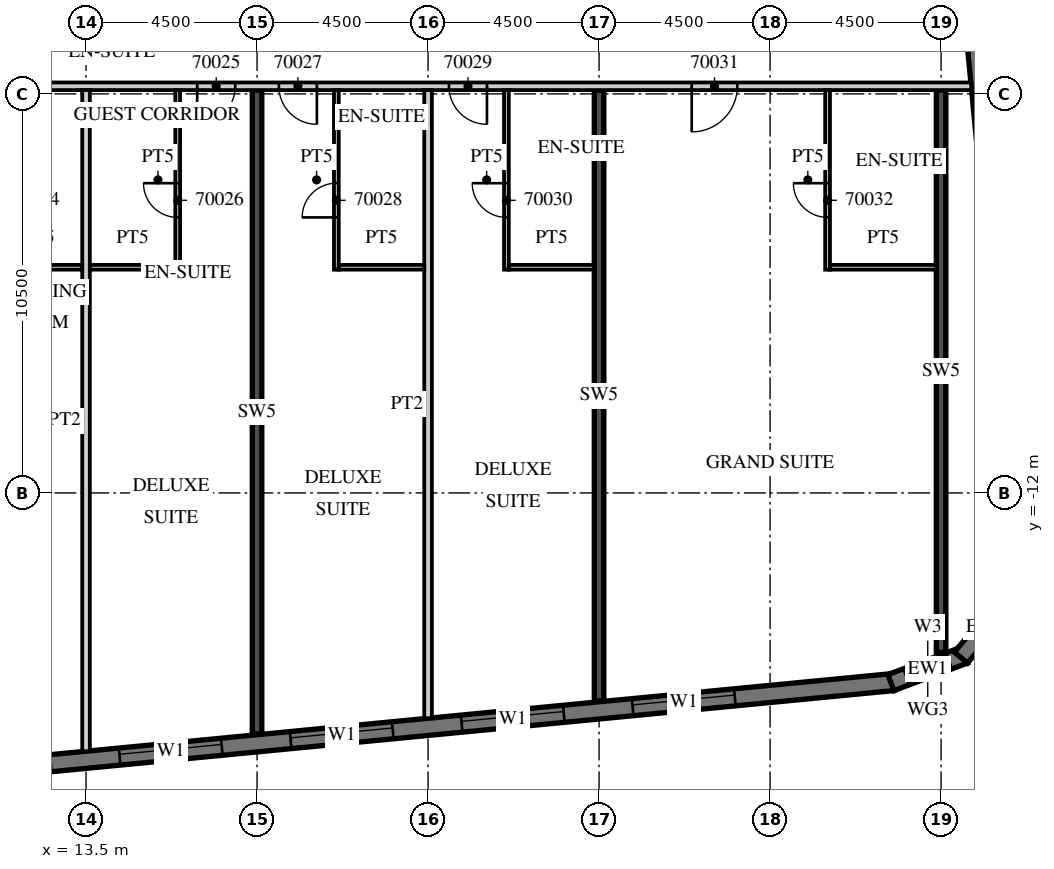
"""IFC4 building model, lengths in metres.
Left out: names, types, materials, properties, quantities, classifications, styles, units other than length and angle.
Written with IfcOpenShell. Run it as: python <this file> out.ifc"""

import sys

from ifc_helpers import new_model, si_unit, direction, frame, frame_2d, origin, place, context, subcontext, project, spatial, polyline, rectangle, outline, extrude, element, fill, save


model = new_model("IFC4")
c1 = context("Model", 3, precision=1e-05, world=origin(), true_north=direction((0.0, 1.0)))
c2 = subcontext(c1, "Body", "Model", "MODEL_VIEW")
j1 = project(units=[si_unit("LENGTHUNIT", "METRE"), si_unit("PLANEANGLEUNIT", "RADIAN")], contexts=[c1])
p1 = place(None, origin())
s1 = spatial("IfcSite", under=j1, at=p1, CompositionType="ELEMENT")
p2 = place(p1, origin())
s2 = spatial("IfcBuilding", under=s1, at=p2, CompositionType="ELEMENT")
p3 = place(p2, frame((0.0, 0.0, 281.7)))
s3 = spatial("IfcBuildingStorey", under=s2, at=p3, CompositionType="ELEMENT", Elevation=281.7)
p4 = place(p3, frame((18.0, -18.341, 0.0), z_axis=(0.0, 0.0, 1.0), x_axis=(0.0, 1.0, 0.0)))
e1 = element("IfcWall", 1, at=p4, inside=s3, PredefinedType="SHEAR", context=c2, shape_type="SweptSolid", body=[
    extrude(rectangle(XDim=16.941, YDim=0.25, at=frame_2d((8.47, 0.0))), origin(), (0.0, 0.0, 1.0), 3.3),
])
p5 = place(p3, frame((27.0, -17.474, 0.0), z_axis=(0.0, 0.0, 1.0), x_axis=(0.0, 1.0, 0.0)))
e2 = element("IfcWall", 2, at=p5, inside=s3, PredefinedType="SHEAR", context=c2, shape_type="SweptSolid", body=[
    extrude(rectangle(XDim=16.074, YDim=0.25, at=frame_2d((8.037, 0.0))), origin(), (0.0, 0.0, 1.0), 3.3),
])
p6 = place(p3, frame((36.0, -16.199, 0.0), z_axis=(0.0, 0.0, 1.0), x_axis=(0.0, 1.0, 0.0)))
e3 = element("IfcWall", 3, at=p6, inside=s3, PredefinedType="SHEAR", context=c2, shape_type="SweptSolid", body=[
    extrude(rectangle(XDim=14.799, YDim=0.25, at=frame_2d((7.399, 0.0))), origin(), (0.0, 0.0, 1.0), 3.3),
])
p7 = place(p3, frame((-13.521, -21.624, 0.0), z_axis=(0.0, 0.0, 1.0), x_axis=(0.995396186218, 0.095845878695, 0.0)))
e4 = element("IfcWall", 4, at=p7, inside=s3, PredefinedType="SOLIDWALL", context=c2, shape_type="SweptSolid", body=[
    extrude(rectangle(XDim=48.481, YDim=0.45, at=frame_2d((24.241, 0.0))), origin(), (0.0, 0.0, 1.0), 3.02),
])
p8 = place(p7, frame((0.91, 0.0, 0.45)))
e5 = element("IfcOpeningElement", 5, at=p8, cuts=e4, PredefinedType="OPENING", context=c2, shape_type="SweptSolid", body=[
    extrude(rectangle(XDim=2.7, YDim=2.25, at=frame_2d((1.35, 1.125))), frame((0.0, 0.235, 0.0), z_axis=(0.0, -1.0, 0.0), x_axis=(1.0, 0.0, 0.0)), (0.0, 0.0, 1.0), 0.47),
])
p9 = place(p7, frame((5.431, 0.0, 0.45)))
e6 = element("IfcOpeningElement", 6, at=p9, cuts=e4, PredefinedType="OPENING", context=c2, shape_type="SweptSolid", body=[
    extrude(rectangle(XDim=2.7, YDim=2.25, at=frame_2d((1.35, 1.125))), frame((0.0, 0.235, 0.0), z_axis=(0.0, -1.0, 0.0), x_axis=(1.0, 0.0, 0.0)), (0.0, 0.0, 1.0), 0.47),
])
p10 = place(p7, frame((9.952, 0.0, 0.45)))
e7 = element("IfcOpeningElement", 7, at=p10, cuts=e4, PredefinedType="OPENING", context=c2, shape_type="SweptSolid", body=[
    extrude(rectangle(XDim=2.7, YDim=2.25, at=frame_2d((1.35, 1.125))), frame((0.0, 0.235, 0.0), z_axis=(0.0, -1.0, 0.0), x_axis=(1.0, 0.0, 0.0)), (0.0, 0.0, 1.0), 0.47),
])
p11 = place(p7, frame((14.473, 0.0, 0.45)))
e8 = element("IfcOpeningElement", 8, at=p11, cuts=e4, PredefinedType="OPENING", context=c2, shape_type="SweptSolid", body=[
    extrude(rectangle(XDim=2.7, YDim=2.25, at=frame_2d((1.35, 1.125))), frame((0.0, 0.235, 0.0), z_axis=(0.0, -1.0, 0.0), x_axis=(1.0, 0.0, 0.0)), (0.0, 0.0, 1.0), 0.47),
])
p12 = place(p7, frame((18.994, 0.0, 0.45)))
e9 = element("IfcOpeningElement", 9, at=p12, cuts=e4, PredefinedType="OPENING", context=c2, shape_type="SweptSolid", body=[
    extrude(rectangle(XDim=2.7, YDim=2.25, at=frame_2d((1.35, 1.125))), frame((0.0, 0.235, 0.0), z_axis=(0.0, -1.0, 0.0), x_axis=(1.0, 0.0, 0.0)), (0.0, 0.0, 1.0), 0.47),
])
p13 = place(p7, frame((23.514, 0.0, 0.45)))
e10 = element("IfcOpeningElement", 10, at=p13, cuts=e4, PredefinedType="OPENING", context=c2, shape_type="SweptSolid", body=[
    extrude(rectangle(XDim=2.7, YDim=2.25, at=frame_2d((1.35, 1.125))), frame((0.0, 0.235, 0.0), z_axis=(0.0, -1.0, 0.0), x_axis=(1.0, 0.0, 0.0)), (0.0, 0.0, 1.0), 0.47),
])
p14 = place(p7, frame((28.035, 0.0, 0.45)))
e11 = element("IfcOpeningElement", 11, at=p14, cuts=e4, PredefinedType="OPENING", context=c2, shape_type="SweptSolid", body=[
    extrude(rectangle(XDim=2.7, YDim=2.25, at=frame_2d((1.35, 1.125))), frame((0.0, 0.235, 0.0), z_axis=(0.0, -1.0, 0.0), x_axis=(1.0, 0.0, 0.0)), (0.0, 0.0, 1.0), 0.47),
])
p15 = place(p7, frame((32.556, 0.0, 0.45)))
e12 = element("IfcOpeningElement", 12, at=p15, cuts=e4, PredefinedType="OPENING", context=c2, shape_type="SweptSolid", body=[
    extrude(rectangle(XDim=2.7, YDim=2.25, at=frame_2d((1.35, 1.125))), frame((0.0, 0.235, 0.0), z_axis=(0.0, -1.0, 0.0), x_axis=(1.0, 0.0, 0.0)), (0.0, 0.0, 1.0), 0.47),
])
p16 = place(p7, frame((37.077, 0.0, 0.45)))
e13 = element("IfcOpeningElement", 13, at=p16, cuts=e4, PredefinedType="OPENING", context=c2, shape_type="SweptSolid", body=[
    extrude(rectangle(XDim=2.7, YDim=2.25, at=frame_2d((1.35, 1.125))), frame((0.0, 0.235, 0.0), z_axis=(0.0, -1.0, 0.0), x_axis=(1.0, 0.0, 0.0)), (0.0, 0.0, 1.0), 0.47),
])
p17 = place(p7, frame((41.598, 0.0, 0.45)))
e14 = element("IfcOpeningElement", 14, at=p17, cuts=e4, PredefinedType="OPENING", context=c2, shape_type="SweptSolid", body=[
    extrude(rectangle(XDim=2.7, YDim=2.25, at=frame_2d((1.35, 1.125))), frame((0.0, 0.235, 0.0), z_axis=(0.0, -1.0, 0.0), x_axis=(1.0, 0.0, 0.0)), (0.0, 0.0, 1.0), 0.47),
])
p18 = place(p3, frame((34.679, -16.99, 0.0), z_axis=(0.0, 0.0, 1.0), x_axis=(0.936677599948, 0.350192909346, 0.0)))
e15 = element("IfcWall", 15, at=p18, inside=s3, PredefinedType="SOLIDWALL", context=c2, shape_type="SweptSolid", body=[
    extrude(outline(polyline([(0.0, -0.225), (2.071, -0.225), (1.95, 0.225), (0.121, 0.225), (0.0, -0.225)])), origin(), (0.0, 0.0, 1.0), 3.02),
])
p19 = place(p18, frame((0.435, 0.0, 0.45)))
e16 = element("IfcOpeningElement", 16, at=p19, cuts=e15, PredefinedType="OPENING", context=c2, shape_type="SweptSolid", body=[
    extrude(rectangle(XDim=1.2, YDim=2.25, at=frame_2d((0.6, 1.125))), frame((0.0, 0.235, 0.0), z_axis=(0.0, -1.0, 0.0), x_axis=(1.0, 0.0, 0.0)), (0.0, 0.0, 1.0), 0.47),
])
p20 = place(p3, frame((36.524, -16.333, 0.0), z_axis=(0.0, 0.0, 1.0), x_axis=(0.636046112757, 0.771651049663, 0.0)))
e17 = element("IfcWall", 17, at=p20, inside=s3, PredefinedType="SOLIDWALL", context=c2, shape_type="SweptSolid", body=[
    extrude(outline(polyline([(0.0, -0.225), (2.071, -0.225), (1.95, 0.225), (0.121, 0.225), (0.0, -0.225)])), origin(), (0.0, 0.0, 1.0), 3.02),
])
p21 = place(p3, frame((38.132, -12.858, 0.0), z_axis=(0.0, 0.0, 1.0), x_axis=(-0.095847749461, 0.995396006082, 0.0)))
e18 = element("IfcWall", 18, at=p21, inside=s3, PredefinedType="SOLIDWALL", context=c2, shape_type="SweptSolid", body=[
    extrude(rectangle(XDim=32.0, YDim=0.45, at=frame_2d((16.0, 0.0))), origin(), (0.0, 0.0, 1.0), 3.02),
])
p22 = place(p3, frame((-13.5, -1.3, 0.0), z_axis=(0.0, 0.0, 1.0), x_axis=(1.0, 0.0, 0.0)))
e19 = element("IfcWall", 19, at=p22, inside=s3, PredefinedType="PARTITIONING", context=c2, shape_type="SweptSolid", body=[
    extrude(rectangle(XDim=50.293, YDim=0.2, at=frame_2d((25.146, 0.0))), origin(), (0.0, 0.0, 1.0), 3.02),
])
p23 = place(p22, frame((2.925, 0.0, 0.0)))
e20 = element("IfcOpeningElement", 20, at=p23, cuts=e19, PredefinedType="OPENING", context=c2, shape_type="SweptSolid", body=[
    extrude(rectangle(XDim=1.0, YDim=2.1, at=frame_2d((0.5, 1.05))), frame((0.0, 0.11, 0.0), z_axis=(0.0, -1.0, 0.0), x_axis=(1.0, 0.0, 0.0)), (0.0, 0.0, 1.0), 0.22),
])
p24 = place(p22, frame((6.938, 0.0, 0.0)))
e21 = element("IfcOpeningElement", 21, at=p24, cuts=e19, PredefinedType="OPENING", context=c2, shape_type="SweptSolid", body=[
    extrude(rectangle(XDim=1.2, YDim=2.1, at=frame_2d((0.6, 1.05))), frame((0.0, 0.11, 0.0), z_axis=(0.0, -1.0, 0.0), x_axis=(1.0, 0.0, 0.0)), (0.0, 0.0, 1.0), 0.22),
])
p25 = place(p22, frame((14.075, 0.0, 0.0)))
e22 = element("IfcOpeningElement", 22, at=p25, cuts=e19, PredefinedType="OPENING", context=c2, shape_type="SweptSolid", body=[
    extrude(rectangle(XDim=1.0, YDim=2.1, at=frame_2d((0.5, 1.05))), frame((0.0, 0.11, 0.0), z_axis=(0.0, -1.0, 0.0), x_axis=(1.0, 0.0, 0.0)), (0.0, 0.0, 1.0), 0.22),
])
p26 = place(p22, frame((18.55, 0.0, 0.0)))
e23 = element("IfcOpeningElement", 23, at=p26, cuts=e19, PredefinedType="OPENING", context=c2, shape_type="SweptSolid", body=[
    extrude(rectangle(XDim=1.0, YDim=2.1, at=frame_2d((0.5, 1.05))), frame((0.0, 0.11, 0.0), z_axis=(0.0, -1.0, 0.0), x_axis=(1.0, 0.0, 0.0)), (0.0, 0.0, 1.0), 0.22),
])
p27 = place(p22, frame((23.075, 0.0, 0.0)))
e24 = element("IfcOpeningElement", 24, at=p27, cuts=e19, PredefinedType="OPENING", context=c2, shape_type="SweptSolid", body=[
    extrude(rectangle(XDim=1.0, YDim=2.1, at=frame_2d((0.5, 1.05))), frame((0.0, 0.11, 0.0), z_axis=(0.0, -1.0, 0.0), x_axis=(1.0, 0.0, 0.0)), (0.0, 0.0, 1.0), 0.22),
])
p28 = place(p22, frame((29.925, 0.0, 0.0)))
e25 = element("IfcOpeningElement", 25, at=p28, cuts=e19, PredefinedType="OPENING", context=c2, shape_type="SweptSolid", body=[
    extrude(rectangle(XDim=1.0, YDim=2.1, at=frame_2d((0.5, 1.05))), frame((0.0, 0.11, 0.0), z_axis=(0.0, -1.0, 0.0), x_axis=(1.0, 0.0, 0.0)), (0.0, 0.0, 1.0), 0.22),
])
p29 = place(p22, frame((32.075, 0.0, 0.0)))
e26 = element("IfcOpeningElement", 26, at=p29, cuts=e19, PredefinedType="OPENING", context=c2, shape_type="SweptSolid", body=[
    extrude(rectangle(XDim=1.0, YDim=2.1, at=frame_2d((0.5, 1.05))), frame((0.0, 0.11, 0.0), z_axis=(0.0, -1.0, 0.0), x_axis=(1.0, 0.0, 0.0)), (0.0, 0.0, 1.0), 0.22),
])
p30 = place(p22, frame((36.55, 0.0, 0.0)))
e27 = element("IfcOpeningElement", 27, at=p30, cuts=e19, PredefinedType="OPENING", context=c2, shape_type="SweptSolid", body=[
    extrude(rectangle(XDim=1.0, YDim=2.1, at=frame_2d((0.5, 1.05))), frame((0.0, 0.11, 0.0), z_axis=(0.0, -1.0, 0.0), x_axis=(1.0, 0.0, 0.0)), (0.0, 0.0, 1.0), 0.22),
])
p31 = place(p22, frame((42.938, 0.0, 0.0)))
e28 = element("IfcOpeningElement", 28, at=p31, cuts=e19, PredefinedType="OPENING", context=c2, shape_type="SweptSolid", body=[
    extrude(rectangle(XDim=1.2, YDim=2.1, at=frame_2d((0.6, 1.05))), frame((0.0, 0.11, 0.0), z_axis=(0.0, -1.0, 0.0), x_axis=(1.0, 0.0, 0.0)), (0.0, 0.0, 1.0), 0.22),
])
p32 = place(p3, frame((13.5, -18.796, 0.0), z_axis=(0.0, 0.0, 1.0), x_axis=(0.0, 1.0, 0.0)))
e29 = element("IfcWall", 29, at=p32, inside=s3, PredefinedType="PARTITIONING", context=c2, shape_type="SweptSolid", body=[
    extrude(rectangle(XDim=17.396, YDim=0.2, at=frame_2d((8.698, 0.0))), origin(), (0.0, 0.0, 1.0), 3.02),
])
p33 = place(p3, frame((11.15, -6.062, 0.0), z_axis=(0.0, 0.0, 1.0), x_axis=(1.0, 0.0, 0.0)))
e30 = element("IfcWall", 30, at=p33, inside=s3, PredefinedType="PARTITIONING", context=c2, shape_type="SweptSolid", body=[
    extrude(rectangle(XDim=2.25, YDim=0.125, at=frame_2d((1.125, 0.0))), origin(), (0.0, 0.0, 1.0), 3.02),
])
p34 = place(p3, frame((15.912, -6.125, 0.0), z_axis=(0.0, 0.0, 1.0), x_axis=(0.0, 1.0, 0.0)))
e31 = element("IfcWall", 31, at=p34, inside=s3, PredefinedType="PARTITIONING", context=c2, shape_type="SweptSolid", body=[
    extrude(rectangle(XDim=4.725, YDim=0.125, at=frame_2d((2.363, 0.0))), origin(), (0.0, 0.0, 1.0), 3.02),
])
p35 = place(p34, frame((1.375, 0.0, 0.0)))
e32 = element("IfcOpeningElement", 32, at=p35, cuts=e31, PredefinedType="OPENING", context=c2, shape_type="SweptSolid", body=[
    extrude(rectangle(XDim=0.9, YDim=2.1, at=frame_2d((0.45, 1.05))), frame((0.0, 0.073, 0.0), z_axis=(0.0, -1.0, 0.0), x_axis=(1.0, 0.0, 0.0)), (0.0, 0.0, 1.0), 0.145),
])
p36 = place(p3, frame((13.6, -6.062, 0.0), z_axis=(0.0, 0.0, 1.0), x_axis=(1.0, 0.0, 0.0)))
e33 = element("IfcWall", 33, at=p36, inside=s3, PredefinedType="PARTITIONING", context=c2, shape_type="SweptSolid", body=[
    extrude(rectangle(XDim=2.25, YDim=0.125, at=frame_2d((1.125, 0.0))), origin(), (0.0, 0.0, 1.0), 3.02),
])
p37 = place(p3, frame((22.5, -17.929, 0.0), z_axis=(0.0, 0.0, 1.0), x_axis=(0.0, 1.0, 0.0)))
e34 = element("IfcWall", 34, at=p37, inside=s3, PredefinedType="PARTITIONING", context=c2, shape_type="SweptSolid", body=[
    extrude(rectangle(XDim=16.529, YDim=0.2, at=frame_2d((8.265, 0.0))), origin(), (0.0, 0.0, 1.0), 3.02),
])
p38 = place(p3, frame((20.087, -6.125, 0.0), z_axis=(0.0, 0.0, 1.0), x_axis=(0.0, 1.0, 0.0)))
e35 = element("IfcWall", 35, at=p38, inside=s3, PredefinedType="PARTITIONING", context=c2, shape_type="SweptSolid", body=[
    extrude(rectangle(XDim=4.725, YDim=0.125, at=frame_2d((2.363, 0.0))), origin(), (0.0, 0.0, 1.0), 3.02),
])
p39 = place(p38, frame((1.375, 0.0, 0.0)))
e36 = element("IfcOpeningElement", 36, at=p39, cuts=e35, PredefinedType="OPENING", context=c2, shape_type="SweptSolid", body=[
    extrude(rectangle(XDim=0.9, YDim=2.1, at=frame_2d((0.45, 1.05))), frame((0.0, 0.073, 0.0), z_axis=(0.0, -1.0, 0.0), x_axis=(1.0, 0.0, 0.0)), (0.0, 0.0, 1.0), 0.145),
])
p40 = place(p3, frame((20.15, -6.062, 0.0), z_axis=(0.0, 0.0, 1.0), x_axis=(1.0, 0.0, 0.0)))
e37 = element("IfcWall", 37, at=p40, inside=s3, PredefinedType="PARTITIONING", context=c2, shape_type="SweptSolid", body=[
    extrude(rectangle(XDim=2.25, YDim=0.125, at=frame_2d((1.125, 0.0))), origin(), (0.0, 0.0, 1.0), 3.02),
])
p41 = place(p3, frame((24.562, -6.125, 0.0), z_axis=(0.0, 0.0, 1.0), x_axis=(0.0, 1.0, 0.0)))
e38 = element("IfcWall", 38, at=p41, inside=s3, PredefinedType="PARTITIONING", context=c2, shape_type="SweptSolid", body=[
    extrude(rectangle(XDim=4.725, YDim=0.125, at=frame_2d((2.363, 0.0))), origin(), (0.0, 0.0, 1.0), 3.02),
])
p42 = place(p41, frame((1.375, 0.0, 0.0)))
e39 = element("IfcOpeningElement", 39, at=p42, cuts=e38, PredefinedType="OPENING", context=c2, shape_type="SweptSolid", body=[
    extrude(rectangle(XDim=0.9, YDim=2.1, at=frame_2d((0.45, 1.05))), frame((0.0, 0.073, 0.0), z_axis=(0.0, -1.0, 0.0), x_axis=(1.0, 0.0, 0.0)), (0.0, 0.0, 1.0), 0.145),
])
p43 = place(p3, frame((24.625, -6.062, 0.0), z_axis=(0.0, 0.0, 1.0), x_axis=(1.0, 0.0, 0.0)))
e40 = element("IfcWall", 40, at=p43, inside=s3, PredefinedType="PARTITIONING", context=c2, shape_type="SweptSolid", body=[
    extrude(rectangle(XDim=2.25, YDim=0.125, at=frame_2d((1.125, 0.0))), origin(), (0.0, 0.0, 1.0), 3.02),
])
p44 = place(p3, frame((33.013, -6.125, 0.0), z_axis=(0.0, 0.0, 1.0), x_axis=(0.0, 1.0, 0.0)))
e41 = element("IfcWall", 41, at=p44, inside=s3, PredefinedType="PARTITIONING", context=c2, shape_type="SweptSolid", body=[
    extrude(rectangle(XDim=4.725, YDim=0.125, at=frame_2d((2.363, 0.0))), origin(), (0.0, 0.0, 1.0), 3.02),
])
p45 = place(p44, frame((1.375, 0.0, 0.0)))
e42 = element("IfcOpeningElement", 42, at=p45, cuts=e41, PredefinedType="OPENING", context=c2, shape_type="SweptSolid", body=[
    extrude(rectangle(XDim=0.9, YDim=2.1, at=frame_2d((0.45, 1.05))), frame((0.0, 0.073, 0.0), z_axis=(0.0, -1.0, 0.0), x_axis=(1.0, 0.0, 0.0)), (0.0, 0.0, 1.0), 0.145),
])
p46 = place(p3, frame((33.075, -6.062, 0.0), z_axis=(0.0, 0.0, 1.0), x_axis=(1.0, 0.0, 0.0)))
e43 = element("IfcWall", 43, at=p46, inside=s3, PredefinedType="PARTITIONING", context=c2, shape_type="SweptSolid", body=[
    extrude(rectangle(XDim=2.8, YDim=0.125, at=frame_2d((1.4, 0.0))), origin(), (0.0, 0.0, 1.0), 3.02),
])
p47 = place(p14, origin())
e44 = element("IfcWindow", 44, at=p47, inside=s3, PartitioningType="SINGLE_PANEL", PredefinedType="WINDOW", context=c2, shape_type="SweptSolid", body=[
    extrude(rectangle(XDim=2.7, YDim=2.25, at=frame_2d((1.35, 1.125))), frame((0.0, 0.09, 0.0), z_axis=(0.0, -1.0, 0.0), x_axis=(1.0, 0.0, 0.0)), (0.0, 0.0, 1.0), 0.06),
])
fill(e11, e44)
p48 = place(p15, origin())
e45 = element("IfcWindow", 45, at=p48, inside=s3, PartitioningType="SINGLE_PANEL", PredefinedType="WINDOW", context=c2, shape_type="SweptSolid", body=[
    extrude(rectangle(XDim=2.7, YDim=2.25, at=frame_2d((1.35, 1.125))), frame((0.0, 0.09, 0.0), z_axis=(0.0, -1.0, 0.0), x_axis=(1.0, 0.0, 0.0)), (0.0, 0.0, 1.0), 0.06),
])
fill(e12, e45)
p49 = place(p16, origin())
e46 = element("IfcWindow", 46, at=p49, inside=s3, PartitioningType="SINGLE_PANEL", PredefinedType="WINDOW", context=c2, shape_type="SweptSolid", body=[
    extrude(rectangle(XDim=2.7, YDim=2.25, at=frame_2d((1.35, 1.125))), frame((0.0, 0.09, 0.0), z_axis=(0.0, -1.0, 0.0), x_axis=(1.0, 0.0, 0.0)), (0.0, 0.0, 1.0), 0.06),
])
fill(e13, e46)
p50 = place(p17, origin())
e47 = element("IfcWindow", 47, at=p50, inside=s3, PartitioningType="SINGLE_PANEL", PredefinedType="WINDOW", context=c2, shape_type="SweptSolid", body=[
    extrude(rectangle(XDim=2.7, YDim=2.25, at=frame_2d((1.35, 1.125))), frame((0.0, 0.09, 0.0), z_axis=(0.0, -1.0, 0.0), x_axis=(1.0, 0.0, 0.0)), (0.0, 0.0, 1.0), 0.06),
])
fill(e14, e47)
p51 = place(p19, origin())
e48 = element("IfcWindow", 48, at=p51, inside=s3, PartitioningType="SINGLE_PANEL", PredefinedType="WINDOW", context=c2, shape_type="SweptSolid", body=[
    extrude(rectangle(XDim=1.2, YDim=2.25, at=frame_2d((0.6, 1.125))), frame((0.0, 0.09, 0.0), z_axis=(0.0, -1.0, 0.0), x_axis=(1.0, 0.0, 0.0)), (0.0, 0.0, 1.0), 0.06),
])
fill(e16, e48)
p52 = place(p28, origin())
e49 = element("IfcDoor", 49, at=p52, inside=s3, OperationType="SINGLE_SWING_LEFT", PredefinedType="DOOR", context=c2, shape_type="SweptSolid", body=[
    extrude(rectangle(XDim=1.0, YDim=2.1, at=frame_2d((0.5, 1.05))), frame((0.0, 0.025, 0.0), z_axis=(0.0, -1.0, 0.0), x_axis=(1.0, 0.0, 0.0)), (0.0, 0.0, 1.0), 0.05),
])
fill(e25, e49)
p53 = place(p35, origin())
e50 = element("IfcDoor", 50, at=p53, inside=s3, OperationType="SINGLE_SWING_RIGHT", PredefinedType="DOOR", context=c2, shape_type="SweptSolid", body=[
    extrude(rectangle(XDim=0.9, YDim=2.1, at=frame_2d((0.45, 1.05))), frame((0.0, 0.025, 0.0), z_axis=(0.0, -1.0, 0.0), x_axis=(1.0, 0.0, 0.0)), (0.0, 0.0, 1.0), 0.05),
])
fill(e32, e50)
p54 = place(p29, origin())
e51 = element("IfcDoor", 51, at=p54, inside=s3, OperationType="SINGLE_SWING_RIGHT", PredefinedType="DOOR", context=c2, shape_type="SweptSolid", body=[
    extrude(rectangle(XDim=1.0, YDim=2.1, at=frame_2d((0.5, 1.05))), frame((0.0, 0.025, 0.0), z_axis=(0.0, -1.0, 0.0), x_axis=(1.0, 0.0, 0.0)), (0.0, 0.0, 1.0), 0.05),
])
fill(e26, e51)
p55 = place(p39, origin())
e52 = element("IfcDoor", 52, at=p55, inside=s3, OperationType="SINGLE_SWING_LEFT", PredefinedType="DOOR", context=c2, shape_type="SweptSolid", body=[
    extrude(rectangle(XDim=0.9, YDim=2.1, at=frame_2d((0.45, 1.05))), frame((0.0, 0.025, 0.0), z_axis=(0.0, -1.0, 0.0), x_axis=(1.0, 0.0, 0.0)), (0.0, 0.0, 1.0), 0.05),
])
fill(e36, e52)
p56 = place(p30, origin())
e53 = element("IfcDoor", 53, at=p56, inside=s3, OperationType="SINGLE_SWING_RIGHT", PredefinedType="DOOR", context=c2, shape_type="SweptSolid", body=[
    extrude(rectangle(XDim=1.0, YDim=2.1, at=frame_2d((0.5, 1.05))), frame((0.0, 0.025, 0.0), z_axis=(0.0, -1.0, 0.0), x_axis=(1.0, 0.0, 0.0)), (0.0, 0.0, 1.0), 0.05),
])
fill(e27, e53)
p57 = place(p42, origin())
e54 = element("IfcDoor", 54, at=p57, inside=s3, OperationType="SINGLE_SWING_RIGHT", PredefinedType="DOOR", context=c2, shape_type="SweptSolid", body=[
    extrude(rectangle(XDim=0.9, YDim=2.1, at=frame_2d((0.45, 1.05))), frame((0.0, 0.025, 0.0), z_axis=(0.0, -1.0, 0.0), x_axis=(1.0, 0.0, 0.0)), (0.0, 0.0, 1.0), 0.05),
])
fill(e39, e54)
p58 = place(p31, origin())
e55 = element("IfcDoor", 55, at=p58, inside=s3, OperationType="SINGLE_SWING_LEFT", PredefinedType="DOOR", context=c2, shape_type="SweptSolid", body=[
    extrude(rectangle(XDim=1.2, YDim=2.1, at=frame_2d((0.6, 1.05))), frame((0.0, 0.025, 0.0), z_axis=(0.0, -1.0, 0.0), x_axis=(1.0, 0.0, 0.0)), (0.0, 0.0, 1.0), 0.05),
])
fill(e28, e55)
p59 = place(p45, origin())
e56 = element("IfcDoor", 56, at=p59, inside=s3, OperationType="SINGLE_SWING_RIGHT", PredefinedType="DOOR", context=c2, shape_type="SweptSolid", body=[
    extrude(rectangle(XDim=0.9, YDim=2.1, at=frame_2d((0.45, 1.05))), frame((0.0, 0.025, 0.0), z_axis=(0.0, -1.0, 0.0), x_axis=(1.0, 0.0, 0.0)), (0.0, 0.0, 1.0), 0.05),
])
fill(e42, e56)
save(model, sys.argv[1])
